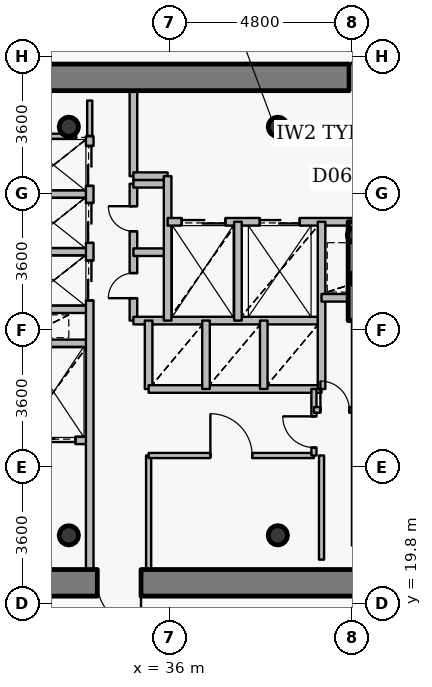
"""IFC4 building model, lengths in metres.
Left out: names, types, materials, properties, quantities, classifications, styles, units other than length and angle.
Written with IfcOpenShell. Run it as: python <this file> out.ifc"""

import sys

from ifc_helpers import new_model, si_unit, direction, frame, frame_2d, origin, origin_2d, place, context, subcontext, project, spatial, rectangle, hollow_circle, extrude, source, transform, mapped, element, fill, save


model = new_model("IFC4")
c1 = context("Model", 3, precision=1e-05, world=origin(), true_north=direction((0.0, 1.0)))
c2 = subcontext(c1, "Body", "Model", "MODEL_VIEW")
j1 = project(units=[si_unit("LENGTHUNIT", "METRE"), si_unit("PLANEANGLEUNIT", "RADIAN")], contexts=[c1])
p1 = place(None, origin())
s1 = spatial("IfcSite", under=j1, at=p1, CompositionType="ELEMENT")
p2 = place(p1, origin())
s2 = spatial("IfcBuilding", under=s1, at=p2, CompositionType="ELEMENT")
p3 = place(p2, frame((0.0, 0.0, 217.8)))
s3 = spatial("IfcBuildingStorey", under=s2, at=p3, CompositionType="ELEMENT", Elevation=217.8)
for number, where, z_axis, x_axis in (
    (1, (33.35, 21.6, 0.0), (0.0, 0.0, 1.0), (1.0, 0.0, 0.0)),
    (2, (38.85, 21.6, 0.0), (0.0, 0.0, 1.0), (1.0, 0.0, 0.0)),
    (3, (38.85, 32.35, 0.0), (0.0, 0.0, 1.0), (1.0, 0.0, 0.0)),
    (4, (33.35, 32.35, 0.0), (0.0, 0.0, 1.0), (1.0, 0.0, 0.0)),
):
    element("IfcColumn", number, at=place(p3, frame(where, z_axis=z_axis, x_axis=x_axis)), inside=s3, PredefinedType="COLUMN", context=c2, shape_type="SweptSolid", body=[
        extrude(hollow_circle(Radius=0.254, WallThickness=0.02, at=origin_2d()), origin(), (0.0, 0.0, 1.0), 3.75),
    ])
for number, where, z_axis, x_axis in (
    (5, (40.95, 28.35, 0.0), (0.0, 0.0, 1.0), (1.0, 0.0, 0.0)),
    (6, (40.88, 29.5, 0.0), (0.0, 0.0, 1.0), (1.0, 0.0, 0.0)),
):
    element("IfcColumn", number, at=place(p3, frame(where, z_axis=z_axis, x_axis=x_axis)), inside=s3, PredefinedType="COLUMN", context=c2, shape_type="SweptSolid", body=[
        extrude(hollow_circle(Radius=0.203, WallThickness=0.016, at=origin_2d()), origin(), (0.0, 0.0, 1.0), 3.75),
    ])
p4 = place(p3, frame((27.05, 33.65, 0.0), z_axis=(0.0, 0.0, 1.0), x_axis=(1.0, 0.0, 0.0)))
e7 = element("IfcWall", 7, at=p4, inside=s3, PredefinedType="SHEAR", context=c2, shape_type="SweptSolid", body=[
    extrude(rectangle(XDim=17.9, YDim=0.7, at=frame_2d((8.95, 0.0))), origin(), (0.0, 0.0, 1.0), 3.05),
])
p5 = place(p4, frame((13.675, 0.0, 0.0)))
e8 = element("IfcOpeningElement", 8, at=p5, cuts=e7, PredefinedType="OPENING", context=c2, shape_type="SweptSolid", body=[
    extrude(rectangle(XDim=1.15, YDim=2.15, at=origin_2d()), frame((0.575, 0.36, 1.075), z_axis=(0.0, -1.0, 0.0), x_axis=(1.0, 0.0, 0.0)), (0.0, 0.0, 1.0), 0.72),
])
p6 = place(p3, frame((44.95, 20.35, 0.0), z_axis=(0.0, 0.0, 1.0), x_axis=(-1.0, 0.0, 0.0)))
e9 = element("IfcWall", 9, at=p6, inside=s3, PredefinedType="SHEAR", context=c2, shape_type="SweptSolid", body=[
    extrude(rectangle(XDim=17.9, YDim=0.7, at=frame_2d((8.95, 0.0))), origin(), (0.0, 0.0, 1.0), 3.05),
])
p7 = place(p6, frame((9.7, 0.0, 0.0)))
e10 = element("IfcOpeningElement", 10, at=p7, cuts=e9, PredefinedType="OPENING", context=c2, shape_type="SweptSolid", body=[
    extrude(rectangle(XDim=1.15, YDim=2.15, at=origin_2d()), frame((0.575, 0.36, 1.075), z_axis=(0.0, -1.0, 0.0), x_axis=(1.0, 0.0, 0.0)), (0.0, 0.0, 1.0), 0.72),
])
p8 = place(p3, frame((40.9, 27.25, 0.0), z_axis=(0.0, 0.0, 1.0), x_axis=(0.0, 1.0, 0.0)))
e11 = element("IfcWall", 11, at=p8, inside=s3, PredefinedType="SHEAR", context=c2, shape_type="SweptSolid", body=[
    extrude(rectangle(XDim=2.6, YDim=0.4, at=frame_2d((1.3, 0.0))), origin(), (0.0, 0.0, 1.0), 3.1),
])
p9 = place(p3, frame((32.0, 24.1, 0.0), z_axis=(0.0, 0.0, 1.0), x_axis=(1.0, 0.0, 0.0)))
e12 = element("IfcWall", 12, at=p9, inside=s3, PredefinedType="PARTITIONING", context=c2, shape_type="SweptSolid", body=[
    extrude(rectangle(XDim=1.9, YDim=0.2, at=frame_2d((0.95, 0.0))), origin(), (0.0, 0.0, 1.0), 3.085),
])
p10 = place(p9, frame((0.375, 0.0, 0.0)))
e13 = element("IfcOpeningElement", 13, at=p10, cuts=e12, PredefinedType="OPENING", context=c2, shape_type="SweptSolid", body=[
    extrude(rectangle(XDim=1.15, YDim=2.15, at=origin_2d()), frame((0.575, 0.11, 1.075), z_axis=(0.0, -1.0, 0.0), x_axis=(1.0, 0.0, 0.0)), (0.0, 0.0, 1.0), 0.22),
])
for number, where, z_axis, x_axis in (
    (14, (32.0, 26.65, 0.0), (0.0, 0.0, 1.0), (1.0, 0.0, 0.0)),
    (15, (32.0, 27.55, 0.0), (0.0, 0.0, 1.0), (1.0, 0.0, 0.0)),
    (16, (32.0, 29.06, 0.0), (0.0, 0.0, 1.0), (1.0, 0.0, 0.0)),
    (17, (32.0, 30.58, 0.0), (0.0, 0.0, 1.0), (1.0, 0.0, 0.0)),
):
    element("IfcWall", number, at=place(p3, frame(where, z_axis=z_axis, x_axis=x_axis)), inside=s3, PredefinedType="PARTITIONING", context=c2, shape_type="SweptSolid", body=[
        extrude(rectangle(XDim=1.9, YDim=0.2, at=frame_2d((0.95, 0.0))), origin(), (0.0, 0.0, 1.0), 3.085),
    ])
p11 = place(p3, frame((33.9, 20.7, 0.0), z_axis=(0.0, 0.0, 1.0), x_axis=(0.0, 1.0, 0.0)))
e18 = element("IfcWall", 18, at=p11, inside=s3, PredefinedType="PARTITIONING", context=c2, shape_type="SweptSolid", body=[
    extrude(rectangle(XDim=11.4, YDim=0.2, at=frame_2d((5.7, 0.0))), origin(), (0.0, 0.0, 1.0), 3.085),
])
p12 = place(p11, frame((7.08, 0.0, 0.0)))
e19 = element("IfcOpeningElement", 19, at=p12, cuts=e18, PredefinedType="OPENING", context=c2, shape_type="SweptSolid", body=[
    extrude(rectangle(XDim=1.05, YDim=2.15, at=origin_2d()), frame((0.525, 0.11, 1.075), z_axis=(0.0, -1.0, 0.0), x_axis=(1.0, 0.0, 0.0)), (0.0, 0.0, 1.0), 0.22),
])
p13 = place(p11, frame((8.595, 0.0, 0.0)))
e20 = element("IfcOpeningElement", 20, at=p13, cuts=e18, PredefinedType="OPENING", context=c2, shape_type="SweptSolid", body=[
    extrude(rectangle(XDim=1.05, YDim=2.15, at=origin_2d()), frame((0.525, 0.11, 1.075), z_axis=(0.0, -1.0, 0.0), x_axis=(1.0, 0.0, 0.0)), (0.0, 0.0, 1.0), 0.22),
])
p14 = place(p11, frame((10.095, 0.0, 0.0)))
e21 = element("IfcOpeningElement", 21, at=p14, cuts=e18, PredefinedType="OPENING", context=c2, shape_type="SweptSolid", body=[
    extrude(rectangle(XDim=1.05, YDim=2.15, at=origin_2d()), frame((0.525, 0.11, 1.075), z_axis=(0.0, -1.0, 0.0), x_axis=(1.0, 0.0, 0.0)), (0.0, 0.0, 1.0), 0.22),
])
p15 = place(p3, frame((35.05, 27.25, 0.0), z_axis=(0.0, 0.0, 1.0), x_axis=(0.0, 1.0, 0.0)))
e22 = element("IfcWall", 22, at=p15, inside=s3, PredefinedType="PARTITIONING", context=c2, shape_type="SweptSolid", body=[
    extrude(rectangle(XDim=3.6, YDim=0.2, at=frame_2d((1.8, 0.0))), origin(), (0.0, 0.0, 1.0), 3.5),
])
p16 = place(p15, frame((0.59, 0.0, 0.0)))
e23 = element("IfcOpeningElement", 23, at=p16, cuts=e22, PredefinedType="OPENING", context=c2, shape_type="SweptSolid", body=[
    extrude(rectangle(XDim=0.66, YDim=2.05, at=origin_2d()), frame((0.33, 0.11, 1.025), z_axis=(0.0, -1.0, 0.0), x_axis=(1.0, 0.0, 0.0)), (0.0, 0.0, 1.0), 0.22),
])
p17 = place(p15, frame((2.35, 0.0, 0.0)))
e24 = element("IfcOpeningElement", 24, at=p17, cuts=e22, PredefinedType="OPENING", context=c2, shape_type="SweptSolid", body=[
    extrude(rectangle(XDim=0.66, YDim=2.05, at=origin_2d()), frame((0.33, 0.11, 1.025), z_axis=(0.0, -1.0, 0.0), x_axis=(1.0, 0.0, 0.0)), (0.0, 0.0, 1.0), 0.22),
])
p18 = place(p3, frame((35.05, 27.25, 0.0), z_axis=(0.0, 0.0, 1.0), x_axis=(1.0, 0.0, 0.0)))
e25 = element("IfcWall", 25, at=p18, inside=s3, PredefinedType="PARTITIONING", context=c2, shape_type="SweptSolid", body=[
    extrude(rectangle(XDim=4.95, YDim=0.2, at=frame_2d((2.475, 0.0))), origin(), (0.0, 0.0, 1.0), 3.085),
])
for number, where, z_axis, x_axis in (
    (26, (35.05, 29.05, 0.0), (0.0, 0.0, 1.0), (1.0, 0.0, 0.0)),
    (27, (35.05, 30.85, 0.0), (0.0, 0.0, 1.0), (1.0, 0.0, 0.0)),
):
    element("IfcWall", number, at=place(p3, frame(where, z_axis=z_axis, x_axis=x_axis)), inside=s3, PredefinedType="PARTITIONING", context=c2, shape_type="SweptSolid", body=[
        extrude(rectangle(XDim=0.9, YDim=0.2, at=frame_2d((0.45, 0.0))), origin(), (0.0, 0.0, 1.0), 3.5),
    ])
p19 = place(p3, frame((35.05, 31.05, 0.0), z_axis=(0.0, 0.0, 1.0), x_axis=(0.0, 1.0, 0.0)))
e28 = element("IfcWall", 28, at=p19, inside=s3, PredefinedType="PARTITIONING", context=c2, shape_type="SweptSolid", body=[
    extrude(rectangle(XDim=2.25, YDim=0.2, at=frame_2d((1.125, 0.0))), origin(), (0.0, 0.0, 1.0), 3.085),
])
p20 = place(p3, frame((35.05, 31.05, 0.0), z_axis=(0.0, 0.0, 1.0), x_axis=(1.0, 0.0, 0.0)))
e29 = element("IfcWall", 29, at=p20, inside=s3, PredefinedType="PARTITIONING", context=c2, shape_type="SweptSolid", body=[
    extrude(rectangle(XDim=0.9, YDim=0.2, at=frame_2d((0.45, 0.0))), origin(), (0.0, 0.0, 1.0), 3.5),
])
p21 = place(p3, frame((35.45, 20.7, 0.0), z_axis=(0.0, 0.0, 1.0), x_axis=(0.0, 1.0, 0.0)))
e30 = element("IfcWall", 30, at=p21, inside=s3, PredefinedType="PARTITIONING", context=c2, shape_type="SweptSolid", body=[
    extrude(rectangle(XDim=3.0, YDim=0.135, at=frame_2d((1.5, 0.0))), origin(), (0.0, 0.0, 1.0), 3.085),
])
p22 = place(p3, frame((35.45, 23.7, 0.0), z_axis=(0.0, 0.0, 1.0), x_axis=(1.0, 0.0, 0.0)))
e31 = element("IfcWall", 31, at=p22, inside=s3, PredefinedType="PARTITIONING", context=c2, shape_type="SweptSolid", body=[
    extrude(rectangle(XDim=4.35, YDim=0.135, at=frame_2d((2.175, 0.0))), origin(), (0.0, 0.0, 1.0), 3.085),
])
p23 = place(p22, frame((1.625, 0.0, 0.0)))
e32 = element("IfcOpeningElement", 32, at=p23, cuts=e31, PredefinedType="OPENING", context=c2, shape_type="SweptSolid", body=[
    extrude(rectangle(XDim=1.1, YDim=2.15, at=origin_2d()), frame((0.55, 0.078, 1.075), z_axis=(0.0, -1.0, 0.0), x_axis=(1.0, 0.0, 0.0)), (0.0, 0.0, 1.0), 0.155),
])
p24 = place(p3, frame((35.45, 25.45, 0.0), z_axis=(0.0, 0.0, 1.0), x_axis=(0.0, 1.0, 0.0)))
e33 = element("IfcWall", 33, at=p24, inside=s3, PredefinedType="PARTITIONING", context=c2, shape_type="SweptSolid", body=[
    extrude(rectangle(XDim=1.8, YDim=0.2, at=frame_2d((0.9, 0.0))), origin(), (0.0, 0.0, 1.0), 3.5),
])
p25 = place(p3, frame((35.45, 25.45, 0.0), z_axis=(0.0, 0.0, 1.0), x_axis=(1.0, 0.0, 0.0)))
e34 = element("IfcWall", 34, at=p25, inside=s3, PredefinedType="PARTITIONING", context=c2, shape_type="SweptSolid", body=[
    extrude(rectangle(XDim=4.55, YDim=0.2, at=frame_2d((2.275, 0.0))), origin(), (0.0, 0.0, 1.0), 3.085),
])
p26 = place(p3, frame((35.95, 27.25, 0.0), z_axis=(0.0, 0.0, 1.0), x_axis=(0.0, 1.0, 0.0)))
e35 = element("IfcWall", 35, at=p26, inside=s3, PredefinedType="PARTITIONING", context=c2, shape_type="SweptSolid", body=[
    extrude(rectangle(XDim=3.8, YDim=0.2, at=frame_2d((1.9, 0.0))), origin(), (0.0, 0.0, 1.0), 3.5),
])
p27 = place(p3, frame((35.95, 29.85, 0.0), z_axis=(0.0, 0.0, 1.0), x_axis=(1.0, 0.0, 0.0)))
e36 = element("IfcWall", 36, at=p27, inside=s3, PredefinedType="PARTITIONING", context=c2, shape_type="SweptSolid", body=[
    extrude(rectangle(XDim=8.49, YDim=0.2, at=frame_2d((4.245, 0.0))), origin(), (0.0, 0.0, 1.0), 3.085),
])
p28 = place(p27, frame((6.1, 0.0, 0.0)))
e37 = element("IfcOpeningElement", 37, at=p28, cuts=e36, PredefinedType="OPENING", context=c2, shape_type="SweptSolid", body=[
    extrude(rectangle(XDim=1.2, YDim=2.15, at=origin_2d()), frame((0.6, 0.11, 1.075), z_axis=(0.0, -1.0, 0.0), x_axis=(1.0, 0.0, 0.0)), (0.0, 0.0, 1.0), 0.22),
])
p29 = place(p27, frame((0.37, 0.0, 0.0)))
e38 = element("IfcOpeningElement", 38, at=p29, cuts=e36, PredefinedType="OPENING", context=c2, shape_type="SweptSolid", body=[
    extrude(rectangle(XDim=1.15, YDim=2.15, at=origin_2d()), frame((0.575, 0.11, 1.075), z_axis=(0.0, -1.0, 0.0), x_axis=(1.0, 0.0, 0.0)), (0.0, 0.0, 1.0), 0.22),
])
p30 = place(p27, frame((2.425, 0.0, 0.0)))
e39 = element("IfcOpeningElement", 39, at=p30, cuts=e36, PredefinedType="OPENING", context=c2, shape_type="SweptSolid", body=[
    extrude(rectangle(XDim=1.05, YDim=2.15, at=origin_2d()), frame((0.525, 0.11, 1.075), z_axis=(0.0, -1.0, 0.0), x_axis=(1.0, 0.0, 0.0)), (0.0, 0.0, 1.0), 0.22),
])
p31 = place(p3, frame((36.96, 25.45, 0.0), z_axis=(0.0, 0.0, 1.0), x_axis=(0.0, 1.0, 0.0)))
e40 = element("IfcWall", 40, at=p31, inside=s3, PredefinedType="PARTITIONING", context=c2, shape_type="SweptSolid", body=[
    extrude(rectangle(XDim=1.8, YDim=0.2, at=frame_2d((0.9, 0.0))), origin(), (0.0, 0.0, 1.0), 3.5),
])
p32 = place(p3, frame((37.8, 27.25, 0.0), z_axis=(0.0, 0.0, 1.0), x_axis=(0.0, 1.0, 0.0)))
e41 = element("IfcWall", 41, at=p32, inside=s3, PredefinedType="PARTITIONING", context=c2, shape_type="SweptSolid", body=[
    extrude(rectangle(XDim=2.6, YDim=0.2, at=frame_2d((1.3, 0.0))), origin(), (0.0, 0.0, 1.0), 3.5),
])
p33 = place(p3, frame((38.48, 25.45, 0.0), z_axis=(0.0, 0.0, 1.0), x_axis=(0.0, 1.0, 0.0)))
e42 = element("IfcWall", 42, at=p33, inside=s3, PredefinedType="PARTITIONING", context=c2, shape_type="SweptSolid", body=[
    extrude(rectangle(XDim=1.8, YDim=0.2, at=frame_2d((0.9, 0.0))), origin(), (0.0, 0.0, 1.0), 3.5),
])
p34 = place(p3, frame((39.8, 23.7, 0.0), z_axis=(0.0, 0.0, 1.0), x_axis=(0.0, 1.0, 0.0)))
e43 = element("IfcWall", 43, at=p34, inside=s3, PredefinedType="PARTITIONING", context=c2, shape_type="SweptSolid", body=[
    extrude(rectangle(XDim=1.75, YDim=0.135, at=frame_2d((0.875, 0.0))), origin(), (0.0, 0.0, 1.0), 3.5),
])
p35 = place(p34, frame((0.21, 0.0, 0.0)))
e44 = element("IfcOpeningElement", 44, at=p35, cuts=e43, PredefinedType="OPENING", context=c2, shape_type="SweptSolid", body=[
    extrude(rectangle(XDim=0.82, YDim=2.1, at=origin_2d()), frame((0.41, 0.078, 1.05), z_axis=(0.0, -1.0, 0.0), x_axis=(1.0, 0.0, 0.0)), (0.0, 0.0, 1.0), 0.155),
])
p36 = place(p3, frame((39.8, 24.9, 0.0), z_axis=(0.0, 0.0, 1.0), x_axis=(1.0, 0.0, 0.0)))
e45 = element("IfcWall", 45, at=p36, inside=s3, PredefinedType="PARTITIONING", context=c2, shape_type="SweptSolid", body=[
    extrude(rectangle(XDim=1.1, YDim=0.15, at=frame_2d((0.55, 0.0))), origin(), (0.0, 0.0, 1.0), 3.5),
])
p37 = place(p36, frame((0.17, 0.0, 0.0)))
e46 = element("IfcOpeningElement", 46, at=p37, cuts=e45, PredefinedType="OPENING", context=c2, shape_type="SweptSolid", body=[
    extrude(rectangle(XDim=0.76, YDim=2.1, at=origin_2d()), frame((0.38, 0.085, 1.05), z_axis=(0.0, -1.0, 0.0), x_axis=(1.0, 0.0, 0.0)), (0.0, 0.0, 1.0), 0.17),
])
p38 = place(p3, frame((40.0, 25.45, 0.0), z_axis=(0.0, 0.0, 1.0), x_axis=(0.0, 1.0, 0.0)))
e47 = element("IfcWall", 47, at=p38, inside=s3, PredefinedType="PARTITIONING", context=c2, shape_type="SweptSolid", body=[
    extrude(rectangle(XDim=4.4, YDim=0.2, at=frame_2d((2.2, 0.0))), origin(), (0.0, 0.0, 1.0), 3.5),
])
p39 = place(p3, frame((40.0, 27.85, 0.0), z_axis=(0.0, 0.0, 1.0), x_axis=(1.0, 0.0, 0.0)))
e48 = element("IfcWall", 48, at=p39, inside=s3, PredefinedType="PARTITIONING", context=c2, shape_type="SweptSolid", body=[
    extrude(rectangle(XDim=0.9, YDim=0.2, at=frame_2d((0.45, 0.0))), origin(), (0.0, 0.0, 1.0), 3.5),
])
p40 = place(p3, frame((40.9, 21.33, 0.0), z_axis=(0.0, 0.0, 1.0), x_axis=(0.0, 1.0, 0.0)))
e49 = element("IfcWall", 49, at=p40, inside=s3, PredefinedType="PARTITIONING", context=c2, shape_type="SweptSolid", body=[
    extrude(rectangle(XDim=5.91, YDim=0.2, at=frame_2d((2.955, 0.0))), origin(), (0.0, 0.0, 1.0), 3.035),
])
p41 = place(p3, frame((32.36, 32.1, 0.0), z_axis=(0.0, 0.0, 1.0), x_axis=(1.0, 0.0, 0.0)))
e50 = element("IfcWall", 50, at=p41, inside=s3, PredefinedType="PARTITIONING", context=c2, shape_type="SweptSolid", body=[
    extrude(rectangle(XDim=1.18, YDim=0.135, at=frame_2d((0.59, 0.0))), origin(), (0.0, 0.0, 1.0), 3.085),
])
p42 = place(p3, frame((40.0, 23.7, 0.0), z_axis=(0.0, 0.0, 1.0), x_axis=(0.0, -1.0, 0.0)))
e51 = element("IfcWall", 51, at=p42, inside=s3, PredefinedType="PARTITIONING", context=c2, shape_type="SweptSolid", body=[
    extrude(rectangle(XDim=2.74, YDim=0.135, at=frame_2d((1.37, 0.0))), origin(), (0.0, 0.0, 1.0), 3.035),
])
p43 = place(p3, frame((33.9, 32.11, 0.0), z_axis=(0.0, 0.0, 1.0), x_axis=(0.0, 1.0, 0.0)))
e52 = element("IfcWall", 52, at=p43, inside=s3, PredefinedType="PARTITIONING", context=c2, shape_type="SweptSolid", body=[
    extrude(rectangle(XDim=0.93, YDim=0.135, at=frame_2d((0.465, 0.0))), origin(), (0.0, 0.0, 1.0), 3.085),
])
m1 = source(origin(), c2, "Body", "SweptSolid", [
    extrude(rectangle(XDim=1.15, YDim=2.15, at=origin_2d()), frame((0.575, 0.025, 1.075), z_axis=(0.0, -1.0, 0.0), x_axis=(1.0, 0.0, 0.0)), (0.0, 0.0, 1.0), 0.05),
])
p44 = place(p5, origin())
e53 = element("IfcDoor", 53, at=p44, inside=s3, OperationType="SINGLE_SWING_RIGHT", PredefinedType="DOOR", context=c2, shape_type="MappedRepresentation", body=[
    mapped(m1, transform((0.0, 0.0, 0.0), x_axis=(1.0, 0.0, 0.0), y_axis=(0.0, 1.0, 0.0), z_axis=(0.0, 0.0, 1.0), scale=1.0)),
])
fill(e8, e53)
p45 = place(p7, origin())
e54 = element("IfcDoor", 54, at=p45, inside=s3, OperationType="SINGLE_SWING_LEFT", PredefinedType="DOOR", context=c2, shape_type="MappedRepresentation", body=[
    mapped(m1, transform((0.0, 0.0, 0.0), x_axis=(1.0, 0.0, 0.0), y_axis=(0.0, 1.0, 0.0), z_axis=(0.0, 0.0, 1.0), scale=1.0)),
])
fill(e10, e54)
m2 = source(origin(), c2, "Body", "SweptSolid", [
    extrude(rectangle(XDim=1.15, YDim=2.15, at=origin_2d()), frame((0.575, 0.025, 1.075), z_axis=(0.0, -1.0, 0.0), x_axis=(1.0, 0.0, 0.0)), (0.0, 0.0, 1.0), 0.05),
])
p46 = place(p29, origin())
e55 = element("IfcDoor", 55, at=p46, inside=s3, OperationType="DOUBLE_DOOR_SLIDING", PredefinedType="USERDEFINED", context=c2, shape_type="MappedRepresentation", body=[
    mapped(m2, transform((0.0, 0.0, 0.0), x_axis=(1.0, 0.0, 0.0), y_axis=(0.0, 1.0, 0.0), z_axis=(0.0, 0.0, 1.0), scale=1.0)),
])
fill(e38, e55)
p47 = place(p10, origin())
e56 = element("IfcDoor", 56, at=p47, inside=s3, OperationType="DOUBLE_DOOR_SLIDING", PredefinedType="USERDEFINED", context=c2, shape_type="MappedRepresentation", body=[
    mapped(m2, transform((0.0, 0.0, 0.0), x_axis=(1.0, 0.0, 0.0), y_axis=(0.0, 1.0, 0.0), z_axis=(0.0, 0.0, 1.0), scale=1.0)),
])
fill(e13, e56)
m3 = source(origin(), c2, "Body", "SweptSolid", [
    extrude(rectangle(XDim=1.05, YDim=2.15, at=origin_2d()), frame((0.525, 0.025, 1.075), z_axis=(0.0, -1.0, 0.0), x_axis=(1.0, 0.0, 0.0)), (0.0, 0.0, 1.0), 0.05),
])
p48 = place(p30, origin())
e57 = element("IfcDoor", 57, at=p48, inside=s3, OperationType="DOUBLE_DOOR_SLIDING", PredefinedType="USERDEFINED", context=c2, shape_type="MappedRepresentation", body=[
    mapped(m3, transform((0.0, 0.0, 0.0), x_axis=(1.0, 0.0, 0.0), y_axis=(0.0, 1.0, 0.0), z_axis=(0.0, 0.0, 1.0), scale=1.0)),
])
fill(e39, e57)
p49 = place(p12, origin())
e58 = element("IfcDoor", 58, at=p49, inside=s3, OperationType="DOUBLE_DOOR_SLIDING", PredefinedType="USERDEFINED", context=c2, shape_type="MappedRepresentation", body=[
    mapped(m3, transform((0.0, 0.0, 0.0), x_axis=(1.0, 0.0, 0.0), y_axis=(0.0, 1.0, 0.0), z_axis=(0.0, 0.0, 1.0), scale=1.0)),
])
fill(e19, e58)
p50 = place(p13, origin())
e59 = element("IfcDoor", 59, at=p50, inside=s3, OperationType="DOUBLE_DOOR_SLIDING", PredefinedType="USERDEFINED", context=c2, shape_type="MappedRepresentation", body=[
    mapped(m3, transform((0.0, 0.0, 0.0), x_axis=(1.0, 0.0, 0.0), y_axis=(0.0, 1.0, 0.0), z_axis=(0.0, 0.0, 1.0), scale=1.0)),
])
fill(e20, e59)
p51 = place(p14, origin())
e60 = element("IfcDoor", 60, at=p51, inside=s3, OperationType="DOUBLE_DOOR_SLIDING", PredefinedType="USERDEFINED", context=c2, shape_type="MappedRepresentation", body=[
    mapped(m3, transform((0.0, 0.0, 0.0), x_axis=(1.0, 0.0, 0.0), y_axis=(0.0, 1.0, 0.0), z_axis=(0.0, 0.0, 1.0), scale=1.0)),
])
fill(e21, e60)
m4 = source(origin(), c2, "Body", "SweptSolid", [
    extrude(rectangle(XDim=0.66, YDim=2.05, at=origin_2d()), frame((0.33, 0.025, 1.025), z_axis=(0.0, -1.0, 0.0), x_axis=(1.0, 0.0, 0.0)), (0.0, 0.0, 1.0), 0.05),
])
p52 = place(p16, origin())
e61 = element("IfcDoor", 61, at=p52, inside=s3, OperationType="SINGLE_SWING_LEFT", PredefinedType="USERDEFINED", context=c2, shape_type="MappedRepresentation", body=[
    mapped(m4, transform((0.0, 0.0, 0.0), x_axis=(1.0, 0.0, 0.0), y_axis=(0.0, 1.0, 0.0), z_axis=(0.0, 0.0, 1.0), scale=1.0)),
])
fill(e23, e61)
p53 = place(p17, origin())
e62 = element("IfcDoor", 62, at=p53, inside=s3, OperationType="SINGLE_SWING_RIGHT", PredefinedType="USERDEFINED", context=c2, shape_type="MappedRepresentation", body=[
    mapped(m4, transform((0.0, 0.0, 0.0), x_axis=(1.0, 0.0, 0.0), y_axis=(0.0, 1.0, 0.0), z_axis=(0.0, 0.0, 1.0), scale=1.0)),
])
fill(e24, e62)
m5 = source(origin(), c2, "Body", "SweptSolid", [
    extrude(rectangle(XDim=1.1, YDim=2.15, at=origin_2d()), frame((0.55, 0.025, 1.075), z_axis=(0.0, -1.0, 0.0), x_axis=(1.0, 0.0, 0.0)), (0.0, 0.0, 1.0), 0.05),
])
p54 = place(p23, origin())
e63 = element("IfcDoor", 63, at=p54, inside=s3, OperationType="SINGLE_SWING_LEFT", PredefinedType="DOOR", context=c2, shape_type="MappedRepresentation", body=[
    mapped(m5, transform((0.0, 0.0, 0.0), x_axis=(1.0, 0.0, 0.0), y_axis=(0.0, 1.0, 0.0), z_axis=(0.0, 0.0, 1.0), scale=1.0)),
])
fill(e32, e63)
m6 = source(origin(), c2, "Body", "SweptSolid", [
    extrude(rectangle(XDim=0.82, YDim=2.1, at=origin_2d()), frame((0.41, 0.025, 1.05), z_axis=(0.0, -1.0, 0.0), x_axis=(1.0, 0.0, 0.0)), (0.0, 0.0, 1.0), 0.05),
])
p55 = place(p35, origin())
e64 = element("IfcDoor", 64, at=p55, inside=s3, OperationType="SINGLE_SWING_RIGHT", PredefinedType="DOOR", context=c2, shape_type="MappedRepresentation", body=[
    mapped(m6, transform((0.0, 0.0, 0.0), x_axis=(1.0, 0.0, 0.0), y_axis=(0.0, 1.0, 0.0), z_axis=(0.0, 0.0, 1.0), scale=1.0)),
])
fill(e44, e64)
m7 = source(origin(), c2, "Body", "SweptSolid", [
    extrude(rectangle(XDim=0.76, YDim=2.1, at=origin_2d()), frame((0.38, 0.025, 1.05), z_axis=(0.0, -1.0, 0.0), x_axis=(1.0, 0.0, 0.0)), (0.0, 0.0, 1.0), 0.05),
])
p56 = place(p37, origin())
e65 = element("IfcDoor", 65, at=p56, inside=s3, OperationType="SINGLE_SWING_LEFT", PredefinedType="DOOR", context=c2, shape_type="MappedRepresentation", body=[
    mapped(m7, transform((0.0, 0.0, 0.0), x_axis=(1.0, 0.0, 0.0), y_axis=(0.0, 1.0, 0.0), z_axis=(0.0, 0.0, 1.0), scale=1.0)),
])
fill(e46, e65)
save(model, sys.argv[1])
